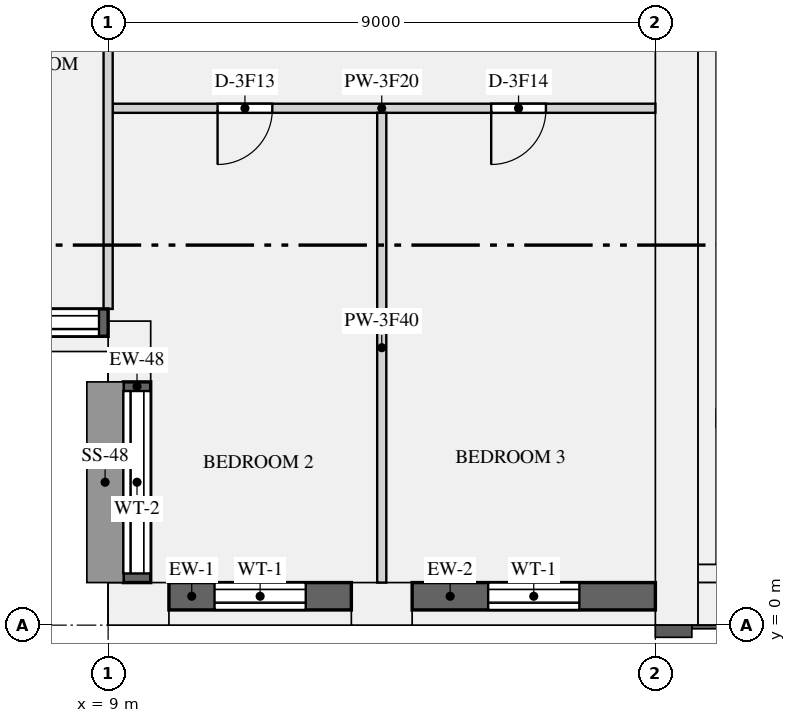
"""IFC4 building model, lengths in metres.
Left out: names, types, materials, properties, quantities, classifications, styles, units other than length and angle.
Written with IfcOpenShell. Run it as: python <this file> out.ifc"""

import sys

from ifc_helpers import new_model, si_unit, direction, frame, frame_2d, origin, origin_2d, place, context, subcontext, project, spatial, rectangle, extrude, element, fill, save


model = new_model("IFC4")
c1 = context("Model", 3, precision=1e-05, world=origin(), true_north=direction((0.0, 1.0)))
c2 = subcontext(c1, "Body", "Model", "MODEL_VIEW")
j1 = project(units=[si_unit("LENGTHUNIT", "METRE"), si_unit("PLANEANGLEUNIT", "RADIAN")], contexts=[c1])
p1 = place(None, origin())
s1 = spatial("IfcSite", under=j1, at=p1, CompositionType="ELEMENT")
p2 = place(p1, origin())
s2 = spatial("IfcBuilding", under=s1, at=p2, CompositionType="ELEMENT")
p3 = place(p2, frame((0.0, 0.0, 182.25)))
s3 = spatial("IfcBuildingStorey", under=s2, at=p3, CompositionType="ELEMENT", Elevation=182.25)
p4 = place(p3, frame((9.5, 0.35, 0.0), z_axis=(0.0, 0.0, 1.0), x_axis=(1.0, 0.0, 0.0)))
e1 = element("IfcColumn", 1, at=p4, inside=s3, PredefinedType="USERDEFINED", context=c2, shape_type="SweptSolid", body=[
    extrude(rectangle(XDim=1.0, YDim=0.7, at=origin_2d()), origin(), (0.0, 0.0, 1.0), 2.65),
])
for number, where, z_axis, x_axis in (
    (2, (13.5, 0.35, 0.0), (0.0, 0.0, 1.0), (1.0, 0.0, 0.0)),
    (3, (9.35, 4.5, 0.0), (0.0, 0.0, 1.0), (0.0, -1.0, 0.0)),
):
    element("IfcColumn", number, at=place(p3, frame(where, z_axis=z_axis, x_axis=x_axis)), inside=s3, PredefinedType="USERDEFINED", context=c2, shape_type="SweptSolid", body=[
        extrude(rectangle(XDim=1.0, YDim=0.7, at=origin_2d()), origin(), (0.0, 0.0, 1.0), 3.15),
    ])
p5 = place(p3, frame((18.35, 0.0, 0.0), z_axis=(0.0, 0.0, 1.0), x_axis=(0.0, 1.0, 0.0)))
e4 = element("IfcWall", 4, at=p5, inside=s3, PredefinedType="SHEAR", context=c2, shape_type="SweptSolid", body=[
    extrude(rectangle(XDim=12.5, YDim=0.7, at=frame_2d((6.25, 0.0))), origin(), (0.0, 0.0, 1.0), 3.15),
])
p6 = place(p3, frame((18.7, 0.35, 0.0), z_axis=(0.0, 0.0, 1.0), x_axis=(1.0, 0.0, 0.0)))
e5 = element("IfcWall", 5, at=p6, inside=s3, PredefinedType="SHEAR", context=c2, shape_type="SweptSolid", body=[
    extrude(rectangle(XDim=34.6, YDim=0.7, at=frame_2d((17.3, 0.0))), origin(), (0.0, 0.0, 1.0), 3.15),
])
p7 = place(p3, frame((18.85, 1.0, 0.0), z_axis=(0.0, 0.0, 1.0), x_axis=(0.0, 1.0, 0.0)))
e6 = element("IfcWall", 6, at=p7, inside=s3, PredefinedType="SHEAR", context=c2, shape_type="SweptSolid", body=[
    extrude(rectangle(XDim=10.9, YDim=0.3, at=frame_2d((5.45, 0.0))), origin(), (0.0, 0.0, 1.0), 3.15),
])
p8 = place(p3, frame((18.7, 0.85, 0.0), z_axis=(0.0, 0.0, 1.0), x_axis=(1.0, 0.0, 0.0)))
e7 = element("IfcWall", 7, at=p8, inside=s3, PredefinedType="SHEAR", context=c2, shape_type="SweptSolid", body=[
    extrude(rectangle(XDim=34.6, YDim=0.3, at=frame_2d((17.3, 0.0))), origin(), (0.0, 0.0, 1.0), 3.15),
])
p9 = place(p3, frame((19.0, 3.4, 0.0), z_axis=(0.0, 0.0, 1.0), x_axis=(1.0, 0.0, 0.0)))
e8 = element("IfcWall", 8, at=p9, inside=s3, PredefinedType="SHEAR", context=c2, shape_type="SweptSolid", body=[
    extrude(rectangle(XDim=2.55, YDim=0.3, at=frame_2d((1.275, 0.0))), origin(), (0.0, 0.0, 1.0), 3.15),
])
p10 = place(p9, frame((0.675, 0.0, 0.0)))
e9 = element("IfcOpeningElement", 9, at=p10, cuts=e8, PredefinedType="OPENING", context=c2, shape_type="SweptSolid", body=[
    extrude(rectangle(XDim=1.2, YDim=2.1, at=frame_2d((0.6, 1.05))), frame((0.0, 0.16, 0.0), z_axis=(0.0, -1.0, 0.0), x_axis=(1.0, 0.0, 0.0)), (0.0, 0.0, 1.0), 0.32),
])
p11 = place(p3, frame((10.0, 0.475, 0.9), z_axis=(0.0, 0.0, 1.0), x_axis=(1.0, 0.0, 0.0)))
e10 = element("IfcWall", 10, at=p11, inside=s3, PredefinedType="SOLIDWALL", context=c2, shape_type="SweptSolid", body=[
    extrude(rectangle(XDim=3.0, YDim=0.45, at=frame_2d((1.5, 0.0))), origin(), (0.0, 0.0, 1.0), 1.75),
])
p12 = place(p11, frame((0.75, 0.0, 0.15)))
e11 = element("IfcOpeningElement", 11, at=p12, cuts=e10, PredefinedType="OPENING", context=c2, shape_type="SweptSolid", body=[
    extrude(rectangle(XDim=1.5, YDim=1.5, at=frame_2d((0.75, 0.75))), frame((0.0, 0.235, 0.0), z_axis=(0.0, -1.0, 0.0), x_axis=(1.0, 0.0, 0.0)), (0.0, 0.0, 1.0), 0.47),
])
p13 = place(p3, frame((14.0, 0.475, 0.9), z_axis=(0.0, 0.0, 1.0), x_axis=(1.0, 0.0, 0.0)))
e12 = element("IfcWall", 12, at=p13, inside=s3, PredefinedType="SOLIDWALL", context=c2, shape_type="SweptSolid", body=[
    extrude(rectangle(XDim=4.0, YDim=0.45, at=frame_2d((2.0, 0.0))), origin(), (0.0, 0.0, 1.0), 1.75),
])
p14 = place(p13, frame((1.25, 0.0, 0.15)))
e13 = element("IfcOpeningElement", 13, at=p14, cuts=e12, PredefinedType="OPENING", context=c2, shape_type="SweptSolid", body=[
    extrude(rectangle(XDim=1.5, YDim=1.5, at=frame_2d((0.75, 0.75))), frame((0.0, 0.235, 0.0), z_axis=(0.0, -1.0, 0.0), x_axis=(1.0, 0.0, 0.0)), (0.0, 0.0, 1.0), 0.47),
])
p15 = place(p3, frame((5.5, 4.975, 0.9), z_axis=(0.0, 0.0, 1.0), x_axis=(1.0, 0.0, 0.0)))
e14 = element("IfcWall", 14, at=p15, inside=s3, PredefinedType="SOLIDWALL", context=c2, shape_type="SweptSolid", body=[
    extrude(rectangle(XDim=3.5, YDim=0.45, at=frame_2d((1.75, 0.0))), origin(), (0.0, 0.0, 1.0), 1.75),
])
p16 = place(p15, frame((0.15, 0.0, 0.15)))
e15 = element("IfcOpeningElement", 15, at=p16, cuts=e14, PredefinedType="OPENING", context=c2, shape_type="SweptSolid", body=[
    extrude(rectangle(XDim=3.2, YDim=1.5, at=frame_2d((1.6, 0.75))), frame((0.0, 0.235, 0.0), z_axis=(0.0, -1.0, 0.0), x_axis=(1.0, 0.0, 0.0)), (0.0, 0.0, 1.0), 0.47),
])
p17 = place(p3, frame((9.475, 4.0, 0.9), z_axis=(0.0, 0.0, 1.0), x_axis=(0.0, -1.0, 0.0)))
e16 = element("IfcWall", 16, at=p17, inside=s3, PredefinedType="SOLIDWALL", context=c2, shape_type="SweptSolid", body=[
    extrude(rectangle(XDim=3.3, YDim=0.45, at=frame_2d((1.65, 0.0))), origin(), (0.0, 0.0, 1.0), 1.75),
])
p18 = place(p17, frame((0.15, 0.0, 0.15)))
e17 = element("IfcOpeningElement", 17, at=p18, cuts=e16, PredefinedType="OPENING", context=c2, shape_type="SweptSolid", body=[
    extrude(rectangle(XDim=3.0, YDim=1.5, at=frame_2d((1.5, 0.75))), frame((0.0, 0.235, 0.0), z_axis=(0.0, -1.0, 0.0), x_axis=(1.0, 0.0, 0.0)), (0.0, 0.0, 1.0), 0.47),
])
p19 = place(p3, frame((9.075, 8.5, 0.0), z_axis=(0.0, 0.0, 1.0), x_axis=(1.0, 0.0, 0.0)))
e18 = element("IfcWall", 18, at=p19, inside=s3, PredefinedType="PARTITIONING", context=c2, shape_type="SweptSolid", body=[
    extrude(rectangle(XDim=8.925, YDim=0.15, at=frame_2d((4.462, 0.0))), origin(), (0.0, 0.0, 1.0), 2.65),
])
p20 = place(p19, frame((1.725, 0.0, 0.0)))
e19 = element("IfcOpeningElement", 19, at=p20, cuts=e18, PredefinedType="OPENING", context=c2, shape_type="SweptSolid", body=[
    extrude(rectangle(XDim=0.9, YDim=2.1, at=frame_2d((0.45, 1.05))), frame((0.0, 0.085, 0.0), z_axis=(0.0, -1.0, 0.0), x_axis=(1.0, 0.0, 0.0)), (0.0, 0.0, 1.0), 0.17),
])
p21 = place(p19, frame((6.225, 0.0, 0.0)))
e20 = element("IfcOpeningElement", 20, at=p21, cuts=e18, PredefinedType="OPENING", context=c2, shape_type="SweptSolid", body=[
    extrude(rectangle(XDim=0.9, YDim=2.1, at=frame_2d((0.45, 1.05))), frame((0.0, 0.085, 0.0), z_axis=(0.0, -1.0, 0.0), x_axis=(1.0, 0.0, 0.0)), (0.0, 0.0, 1.0), 0.17),
])
p22 = place(p3, frame((9.0, 5.2, 0.0), z_axis=(0.0, 0.0, 1.0), x_axis=(0.0, 1.0, 0.0)))
e21 = element("IfcWall", 21, at=p22, inside=s3, PredefinedType="PARTITIONING", context=c2, shape_type="SweptSolid", body=[
    extrude(rectangle(XDim=11.225, YDim=0.15, at=frame_2d((5.613, 0.0))), origin(), (0.0, 0.0, 1.0), 2.65),
])
p23 = place(p22, frame((4.575, 0.0, 0.0)))
e22 = element("IfcOpeningElement", 22, at=p23, cuts=e21, PredefinedType="OPENING", context=c2, shape_type="SweptSolid", body=[
    extrude(rectangle(XDim=0.9, YDim=2.1, at=frame_2d((0.45, 1.05))), frame((0.0, 0.085, 0.0), z_axis=(0.0, -1.0, 0.0), x_axis=(1.0, 0.0, 0.0)), (0.0, 0.0, 1.0), 0.17),
])
p24 = place(p3, frame((13.5, 0.7, 0.0), z_axis=(0.0, 0.0, 1.0), x_axis=(0.0, 1.0, 0.0)))
e23 = element("IfcWall", 23, at=p24, inside=s3, PredefinedType="PARTITIONING", context=c2, shape_type="SweptSolid", body=[
    extrude(rectangle(XDim=7.725, YDim=0.15, at=frame_2d((3.863, 0.0))), origin(), (0.0, 0.0, 1.0), 2.65),
])
p25 = place(p12, origin())
e24 = element("IfcWindow", 24, at=p25, inside=s3, PartitioningType="SINGLE_PANEL", PredefinedType="WINDOW", context=c2, shape_type="SweptSolid", body=[
    extrude(rectangle(XDim=1.5, YDim=1.5, at=frame_2d((0.75, 0.75))), frame((0.0, -0.065, 0.0), z_axis=(0.0, -1.0, 0.0), x_axis=(1.0, 0.0, 0.0)), (0.0, 0.0, 1.0), 0.06),
])
fill(e11, e24)
p26 = place(p14, origin())
e25 = element("IfcWindow", 25, at=p26, inside=s3, PartitioningType="SINGLE_PANEL", PredefinedType="WINDOW", context=c2, shape_type="SweptSolid", body=[
    extrude(rectangle(XDim=1.5, YDim=1.5, at=frame_2d((0.75, 0.75))), frame((0.0, -0.065, 0.0), z_axis=(0.0, -1.0, 0.0), x_axis=(1.0, 0.0, 0.0)), (0.0, 0.0, 1.0), 0.06),
])
fill(e13, e25)
p27 = place(p16, origin())
e26 = element("IfcWindow", 26, at=p27, inside=s3, PartitioningType="SINGLE_PANEL", PredefinedType="WINDOW", context=c2, shape_type="SweptSolid", body=[
    extrude(rectangle(XDim=3.2, YDim=1.5, at=frame_2d((1.6, 0.75))), frame((0.0, -0.065, 0.0), z_axis=(0.0, -1.0, 0.0), x_axis=(1.0, 0.0, 0.0)), (0.0, 0.0, 1.0), 0.06),
])
fill(e15, e26)
p28 = place(p18, origin())
e27 = element("IfcWindow", 27, at=p28, inside=s3, PartitioningType="SINGLE_PANEL", PredefinedType="WINDOW", context=c2, shape_type="SweptSolid", body=[
    extrude(rectangle(XDim=3.0, YDim=1.5, at=frame_2d((1.5, 0.75))), frame((0.0, -0.065, 0.0), z_axis=(0.0, -1.0, 0.0), x_axis=(1.0, 0.0, 0.0)), (0.0, 0.0, 1.0), 0.06),
])
fill(e17, e27)
p29 = place(p20, frame((0.9, 0.0, 0.0), z_axis=(0.0, 0.0, 1.0), x_axis=(-1.0, 0.0, 0.0)))
e28 = element("IfcDoor", 28, at=p29, inside=s3, OperationType="SINGLE_SWING_RIGHT", PredefinedType="DOOR", context=c2, shape_type="SweptSolid", body=[
    extrude(rectangle(XDim=0.9, YDim=2.1, at=frame_2d((0.45, 1.05))), frame((0.0, 0.025, 0.0), z_axis=(0.0, -1.0, 0.0), x_axis=(1.0, 0.0, 0.0)), (0.0, 0.0, 1.0), 0.05),
])
fill(e19, e28)
p30 = place(p21, frame((0.9, 0.0, 0.0), z_axis=(0.0, 0.0, 1.0), x_axis=(-1.0, 0.0, 0.0)))
e29 = element("IfcDoor", 29, at=p30, inside=s3, OperationType="SINGLE_SWING_RIGHT", PredefinedType="DOOR", context=c2, shape_type="SweptSolid", body=[
    extrude(rectangle(XDim=0.9, YDim=2.1, at=frame_2d((0.45, 1.05))), frame((0.0, 0.025, 0.0), z_axis=(0.0, -1.0, 0.0), x_axis=(1.0, 0.0, 0.0)), (0.0, 0.0, 1.0), 0.05),
])
fill(e20, e29)
save(model, sys.argv[1])
